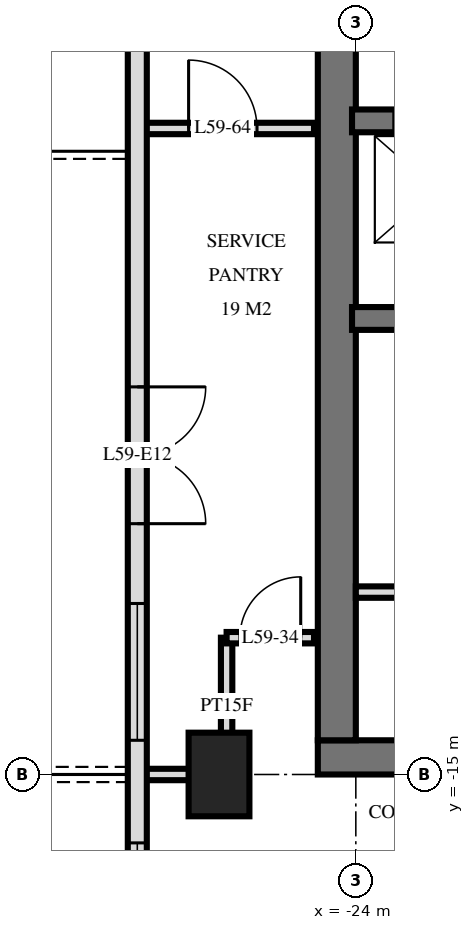
"""IFC4 building model, lengths in metres.
Left out: names, types, materials, properties, quantities, classifications, styles, units other than length and angle.
Written with IfcOpenShell. Run it as: python <this file> out.ifc"""

import sys

from ifc_helpers import new_model, si_unit, direction, frame, frame_2d, origin, origin_2d, place, context, subcontext, project, spatial, rectangle, extrude, element, fill, save


model = new_model("IFC4")
c1 = context("Model", 3, precision=1e-05, world=origin(), true_north=direction((0.0, 1.0)))
c2 = subcontext(c1, "Body", "Model", "MODEL_VIEW")
j1 = project(units=[si_unit("LENGTHUNIT", "METRE"), si_unit("PLANEANGLEUNIT", "RADIAN")], contexts=[c1])
p1 = place(None, origin())
s1 = spatial("IfcSite", under=j1, at=p1, CompositionType="ELEMENT")
p2 = place(p1, origin())
s2 = spatial("IfcBuilding", under=s1, at=p2, CompositionType="ELEMENT")
p3 = place(p2, frame((0.0, 0.0, 225.6)))
s3 = spatial("IfcBuildingStorey", under=s2, at=p3, CompositionType="ELEMENT", Elevation=225.6)
p4 = place(p3, frame((-25.8, -15.0, 0.0), z_axis=(0.0, 0.0, 1.0), x_axis=(0.0, 1.0, 0.0)))
e1 = element("IfcColumn", 1, at=p4, inside=s3, PredefinedType="COLUMN", context=c2, shape_type="SweptSolid", body=[
    extrude(rectangle(XDim=1.1, YDim=0.8, at=origin_2d()), origin(), (0.0, 0.0, 1.0), 3.5),
])
p5 = place(p3, frame((-24.5, -14.775, 0.0), z_axis=(0.0, 0.0, 1.0), x_axis=(1.0, 0.0, 0.0)))
e2 = element("IfcWall", 2, at=p5, inside=s3, PredefinedType="SHEAR", context=c2, shape_type="SweptSolid", body=[
    extrude(rectangle(XDim=14.5, YDim=0.45, at=frame_2d((7.25, 0.0))), origin(), (0.0, 0.0, 1.0), 3.5),
])
p6 = place(p5, frame((6.2, 0.0, 0.0)))
e3 = element("IfcOpeningElement", 3, at=p6, cuts=e2, PredefinedType="OPENING", context=c2, shape_type="SweptSolid", body=[
    extrude(rectangle(XDim=1.2, YDim=2.1, at=frame_2d((0.6, 1.05))), frame((0.0, 0.235, 0.0), z_axis=(0.0, -1.0, 0.0), x_axis=(1.0, 0.0, 0.0)), (0.0, 0.0, 1.0), 0.47),
])
p7 = place(p5, frame((9.25, 0.0, 0.0)))
e4 = element("IfcOpeningElement", 4, at=p7, cuts=e2, PredefinedType="OPENING", context=c2, shape_type="SweptSolid", body=[
    extrude(rectangle(XDim=1.1, YDim=2.1, at=frame_2d((0.55, 1.05))), frame((0.0, 0.235, 0.0), z_axis=(0.0, -1.0, 0.0), x_axis=(1.0, 0.0, 0.0)), (0.0, 0.0, 1.0), 0.47),
])
p8 = place(p5, frame((3.5, 0.0, 0.0)))
e5 = element("IfcOpeningElement", 5, at=p8, cuts=e2, PredefinedType="OPENING", context=c2, shape_type="SweptSolid", body=[
    extrude(rectangle(XDim=0.9, YDim=2.1, at=frame_2d((0.45, 1.05))), frame((0.0, 0.235, 0.0), z_axis=(0.0, -1.0, 0.0), x_axis=(1.0, 0.0, 0.0)), (0.0, 0.0, 1.0), 0.47),
])
p9 = place(p5, frame((1.05, 0.0, 0.0)))
e6 = element("IfcOpeningElement", 6, at=p9, cuts=e2, PredefinedType="OPENING", context=c2, shape_type="SweptSolid", body=[
    extrude(rectangle(XDim=1.0, YDim=2.1, at=frame_2d((0.5, 1.05))), frame((0.0, 0.235, 0.0), z_axis=(0.0, -1.0, 0.0), x_axis=(1.0, 0.0, 0.0)), (0.0, 0.0, 1.0), 0.47),
])
p10 = place(p3, frame((-24.25, -14.55, 0.0), z_axis=(0.0, 0.0, 1.0), x_axis=(0.0, 1.0, 0.0)))
e7 = element("IfcWall", 7, at=p10, inside=s3, PredefinedType="SHEAR", context=c2, shape_type="SweptSolid", body=[
    extrude(rectangle(XDim=14.1, YDim=0.5, at=frame_2d((7.05, 0.0))), origin(), (0.0, 0.0, 1.0), 3.5),
])
p11 = place(p3, frame((-24.05, -6.4, 0.0), z_axis=(0.0, 0.0, 1.0), x_axis=(1.0, 0.0, 0.0)))
e8 = element("IfcWall", 8, at=p11, inside=s3, PredefinedType="SHEAR", context=c2, shape_type="SweptSolid", body=[
    extrude(rectangle(XDim=13.7, YDim=0.3, at=frame_2d((6.85, 0.0))), origin(), (0.0, 0.0, 1.0), 3.5),
])
p12 = place(p11, frame((0.55, 0.0, 0.0)))
e9 = element("IfcOpeningElement", 9, at=p12, cuts=e8, PredefinedType="OPENING", context=c2, shape_type="SweptSolid", body=[
    extrude(rectangle(XDim=1.1, YDim=2.1, at=frame_2d((0.55, 1.05))), frame((0.0, 0.16, 0.0), z_axis=(0.0, -1.0, 0.0), x_axis=(1.0, 0.0, 0.0)), (0.0, 0.0, 1.0), 0.32),
])
p13 = place(p11, frame((5.8, 0.0, 0.0)))
e10 = element("IfcOpeningElement", 10, at=p13, cuts=e8, PredefinedType="OPENING", context=c2, shape_type="SweptSolid", body=[
    extrude(rectangle(XDim=1.1, YDim=2.1, at=frame_2d((0.55, 1.05))), frame((0.0, 0.16, 0.0), z_axis=(0.0, -1.0, 0.0), x_axis=(1.0, 0.0, 0.0)), (0.0, 0.0, 1.0), 0.32),
])
p14 = place(p3, frame((-24.05, -9.0, 0.0), z_axis=(0.0, 0.0, 1.0), x_axis=(1.0, 0.0, 0.0)))
e11 = element("IfcWall", 11, at=p14, inside=s3, PredefinedType="SHEAR", context=c2, shape_type="SweptSolid", body=[
    extrude(rectangle(XDim=13.7, YDim=0.3, at=frame_2d((6.85, 0.0))), origin(), (0.0, 0.0, 1.0), 3.5),
])
p15 = place(p14, frame((8.8, 0.0, 0.0)))
e12 = element("IfcOpeningElement", 12, at=p15, cuts=e11, PredefinedType="OPENING", context=c2, shape_type="SweptSolid", body=[
    extrude(rectangle(XDim=1.1, YDim=2.1, at=frame_2d((0.55, 1.05))), frame((0.0, 0.16, 0.0), z_axis=(0.0, -1.0, 0.0), x_axis=(1.0, 0.0, 0.0)), (0.0, 0.0, 1.0), 0.32),
])
p16 = place(p3, frame((-26.875, -3.325, 0.0), z_axis=(0.0, 0.0, 1.0), x_axis=(0.0, -1.0, 0.0)))
e13 = element("IfcWall", 13, at=p16, inside=s3, PredefinedType="SOLIDWALL", context=c2, shape_type="SweptSolid", body=[
    extrude(rectangle(XDim=21.551, YDim=0.25, at=frame_2d((10.775, 0.0))), origin(), (0.0, 0.0, 1.0), 3.22),
])
p17 = place(p16, frame((6.575, 0.0, 0.0)))
e14 = element("IfcOpeningElement", 14, at=p17, cuts=e13, PredefinedType="OPENING", context=c2, shape_type="SweptSolid", body=[
    extrude(rectangle(XDim=1.8, YDim=2.4, at=frame_2d((0.9, 1.2))), frame((0.0, 0.135, 0.0), z_axis=(0.0, -1.0, 0.0), x_axis=(1.0, 0.0, 0.0)), (0.0, 0.0, 1.0), 0.27),
])
p18 = place(p16, frame((9.425, 0.0, 0.9)))
e15 = element("IfcOpeningElement", 15, at=p18, cuts=e13, PredefinedType="OPENING", context=c2, shape_type="SweptSolid", body=[
    extrude(rectangle(XDim=1.8, YDim=1.5, at=frame_2d((0.9, 0.75))), frame((0.0, 0.135, 0.0), z_axis=(0.0, -1.0, 0.0), x_axis=(1.0, 0.0, 0.0)), (0.0, 0.0, 1.0), 0.27),
])
p19 = place(p16, frame((12.575, 0.0, 0.9)))
e16 = element("IfcOpeningElement", 16, at=p19, cuts=e13, PredefinedType="OPENING", context=c2, shape_type="SweptSolid", body=[
    extrude(rectangle(XDim=1.2, YDim=1.5, at=frame_2d((0.6, 0.75))), frame((0.0, 0.135, 0.0), z_axis=(0.0, -1.0, 0.0), x_axis=(1.0, 0.0, 0.0)), (0.0, 0.0, 1.0), 0.27),
])
p20 = place(p16, frame((15.275, 0.0, 0.0)))
e17 = element("IfcOpeningElement", 17, at=p20, cuts=e13, PredefinedType="OPENING", context=c2, shape_type="SweptSolid", body=[
    extrude(rectangle(XDim=1.8, YDim=2.4, at=frame_2d((0.9, 1.2))), frame((0.0, 0.135, 0.0), z_axis=(0.0, -1.0, 0.0), x_axis=(1.0, 0.0, 0.0)), (0.0, 0.0, 1.0), 0.27),
])
p21 = place(p16, frame((18.875, 0.0, 0.0)))
e18 = element("IfcOpeningElement", 18, at=p21, cuts=e13, PredefinedType="OPENING", context=c2, shape_type="SweptSolid", body=[
    extrude(rectangle(XDim=1.8, YDim=2.4, at=frame_2d((0.9, 1.2))), frame((0.0, 0.135, 0.0), z_axis=(0.0, -1.0, 0.0), x_axis=(1.0, 0.0, 0.0)), (0.0, 0.0, 1.0), 0.27),
])
p22 = place(p3, frame((-24.0, -12.6, 0.0), z_axis=(0.0, 0.0, 1.0), x_axis=(1.0, 0.0, 0.0)))
e19 = element("IfcWall", 19, at=p22, inside=s3, PredefinedType="PARTITIONING", context=c2, shape_type="SweptSolid", body=[
    extrude(rectangle(XDim=2.1, YDim=0.15, at=frame_2d((1.05, 0.0))), origin(), (0.0, 0.0, 1.0), 3.2),
])
p23 = place(p22, frame((0.55, 0.0, 0.0)))
e20 = element("IfcOpeningElement", 20, at=p23, cuts=e19, PredefinedType="OPENING", context=c2, shape_type="SweptSolid", body=[
    extrude(rectangle(XDim=1.0, YDim=2.1, at=frame_2d((0.5, 1.05))), frame((0.0, 0.085, 0.0), z_axis=(0.0, -1.0, 0.0), x_axis=(1.0, 0.0, 0.0)), (0.0, 0.0, 1.0), 0.17),
])
p24 = place(p3, frame((-25.7, -15.0, 0.0), z_axis=(0.0, 0.0, 1.0), x_axis=(0.0, 1.0, 0.0)))
e21 = element("IfcWall", 21, at=p24, inside=s3, PredefinedType="PARTITIONING", context=c2, shape_type="SweptSolid", body=[
    extrude(rectangle(XDim=1.8, YDim=0.15, at=frame_2d((0.9, 0.0))), origin(), (0.0, 0.0, 1.0), 3.22),
])
p25 = place(p3, frame((-26.82, -15.0, 0.0), z_axis=(0.0, 0.0, 1.0), x_axis=(1.0, 0.0, 0.0)))
e22 = element("IfcWall", 22, at=p25, inside=s3, PredefinedType="PARTITIONING", context=c2, shape_type="SweptSolid", body=[
    extrude(rectangle(XDim=1.12, YDim=0.15, at=frame_2d((0.56, 0.0))), origin(), (0.0, 0.0, 1.0), 3.22),
])
p26 = place(p3, frame((-25.7, -13.2, 0.0), z_axis=(0.0, 0.0, 1.0), x_axis=(1.0, 0.0, 0.0)))
e23 = element("IfcWall", 23, at=p26, inside=s3, PredefinedType="PARTITIONING", context=c2, shape_type="SweptSolid", body=[
    extrude(rectangle(XDim=1.15, YDim=0.15, at=frame_2d((0.575, 0.0))), origin(), (0.0, 0.0, 1.0), 3.22),
])
p27 = place(p26, frame((0.175, 0.0, 0.0)))
e24 = element("IfcOpeningElement", 24, at=p27, cuts=e23, PredefinedType="OPENING", context=c2, shape_type="SweptSolid", body=[
    extrude(rectangle(XDim=0.8, YDim=2.1, at=frame_2d((0.4, 1.05))), frame((0.0, 0.085, 0.0), z_axis=(0.0, -1.0, 0.0), x_axis=(1.0, 0.0, 0.0)), (0.0, 0.0, 1.0), 0.17),
])
p28 = place(p3, frame((-26.82, -6.5, 0.0), z_axis=(0.0, 0.0, 1.0), x_axis=(1.0, 0.0, 0.0)))
e25 = element("IfcWall", 25, at=p28, inside=s3, PredefinedType="PARTITIONING", context=c2, shape_type="SweptSolid", body=[
    extrude(rectangle(XDim=2.27, YDim=0.15, at=frame_2d((1.135, 0.0))), origin(), (0.0, 0.0, 1.0), 3.22),
])
p29 = place(p28, frame((0.62, 0.0, 0.0)))
e26 = element("IfcOpeningElement", 26, at=p29, cuts=e25, PredefinedType="OPENING", context=c2, shape_type="SweptSolid", body=[
    extrude(rectangle(XDim=0.9, YDim=2.1, at=frame_2d((0.45, 1.05))), frame((0.0, 0.085, 0.0), z_axis=(0.0, -1.0, 0.0), x_axis=(1.0, 0.0, 0.0)), (0.0, 0.0, 1.0), 0.17),
])
p30 = place(p17, origin())
e27 = element("IfcDoor", 27, at=p30, inside=s3, OperationType="DOUBLE_DOOR_SINGLE_SWING", PredefinedType="DOOR", context=c2, shape_type="SweptSolid", body=[
    extrude(rectangle(XDim=1.8, YDim=2.4, at=frame_2d((0.9, 1.2))), frame((0.0, 0.025, 0.0), z_axis=(0.0, -1.0, 0.0), x_axis=(1.0, 0.0, 0.0)), (0.0, 0.0, 1.0), 0.05),
])
fill(e14, e27)
p31 = place(p18, origin())
e28 = element("IfcWindow", 28, at=p31, inside=s3, PartitioningType="SINGLE_PANEL", PredefinedType="WINDOW", context=c2, shape_type="SweptSolid", body=[
    extrude(rectangle(XDim=1.8, YDim=1.5, at=frame_2d((0.9, 0.75))), frame((0.0, 0.03, 0.0), z_axis=(0.0, -1.0, 0.0), x_axis=(1.0, 0.0, 0.0)), (0.0, 0.0, 1.0), 0.06),
])
fill(e15, e28)
p32 = place(p19, origin())
e29 = element("IfcWindow", 29, at=p32, inside=s3, PartitioningType="SINGLE_PANEL", PredefinedType="WINDOW", context=c2, shape_type="SweptSolid", body=[
    extrude(rectangle(XDim=1.2, YDim=1.5, at=frame_2d((0.6, 0.75))), frame((0.0, 0.03, 0.0), z_axis=(0.0, -1.0, 0.0), x_axis=(1.0, 0.0, 0.0)), (0.0, 0.0, 1.0), 0.06),
])
fill(e16, e29)
p33 = place(p27, origin())
e30 = element("IfcDoor", 30, at=p33, inside=s3, OperationType="SINGLE_SWING_LEFT", PredefinedType="DOOR", context=c2, shape_type="SweptSolid", body=[
    extrude(rectangle(XDim=0.8, YDim=2.1, at=frame_2d((0.4, 1.05))), frame((0.0, 0.025, 0.0), z_axis=(0.0, -1.0, 0.0), x_axis=(1.0, 0.0, 0.0)), (0.0, 0.0, 1.0), 0.05),
])
fill(e24, e30)
p34 = place(p29, origin())
e31 = element("IfcDoor", 31, at=p34, inside=s3, OperationType="SINGLE_SWING_RIGHT", PredefinedType="DOOR", context=c2, shape_type="SweptSolid", body=[
    extrude(rectangle(XDim=0.9, YDim=2.1, at=frame_2d((0.45, 1.05))), frame((0.0, 0.025, 0.0), z_axis=(0.0, -1.0, 0.0), x_axis=(1.0, 0.0, 0.0)), (0.0, 0.0, 1.0), 0.05),
])
fill(e26, e31)
save(model, sys.argv[1])
